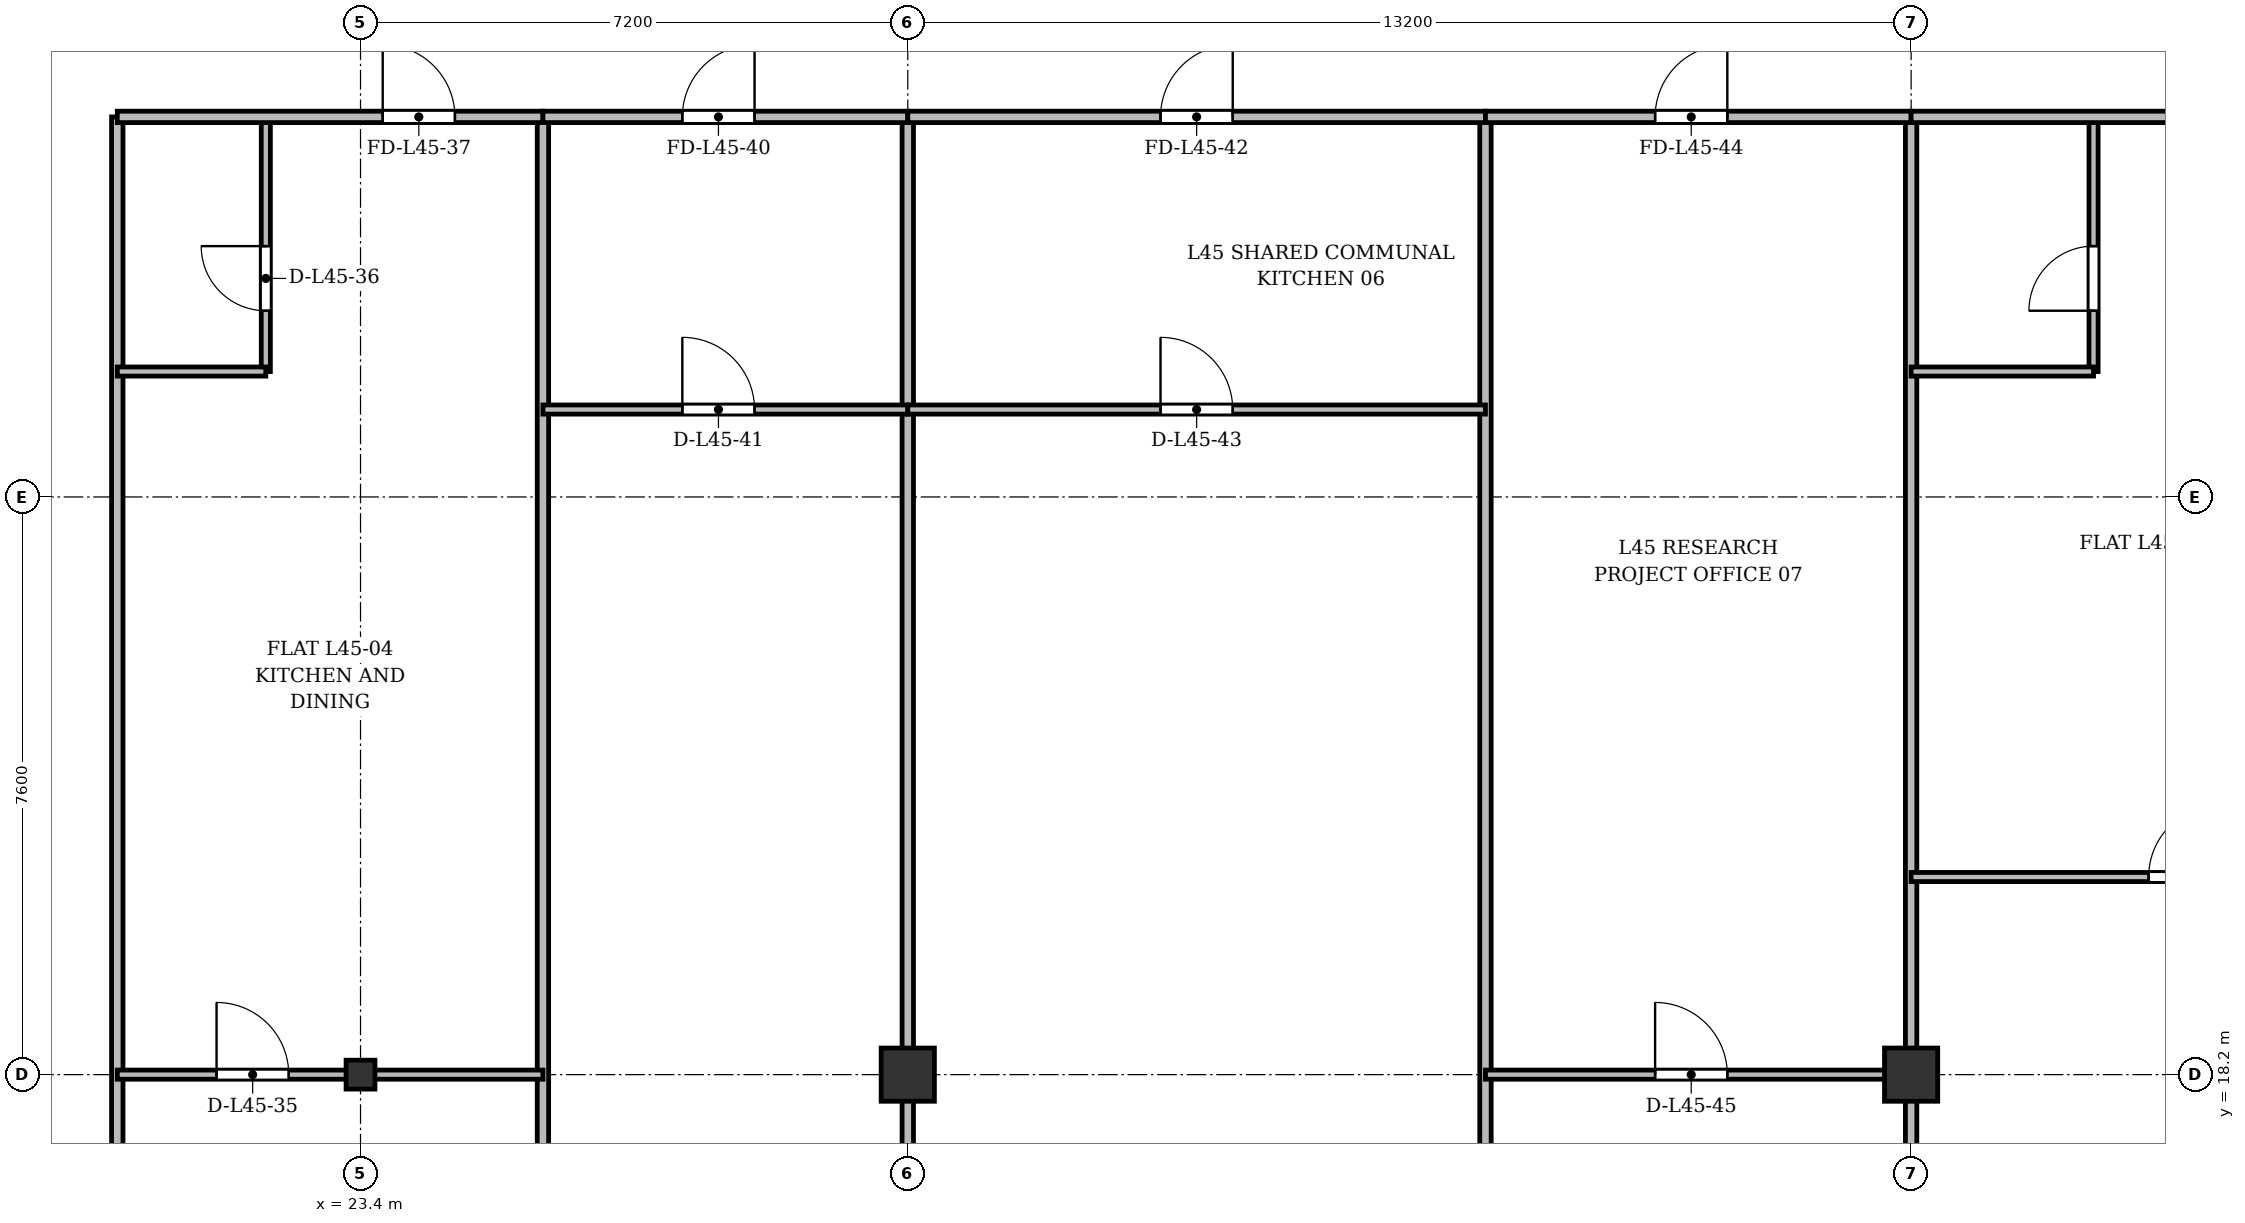
"""IFC4 building model, lengths in metres.
Left out: names, types, materials, properties, quantities, classifications, styles, units other than length and angle.
Written with IfcOpenShell. Run it as: python <this file> out.ifc"""

import sys

from ifc_helpers import new_model, si_unit, direction, frame, frame_2d, origin, origin_2d, place, context, subcontext, project, spatial, rectangle, i_section, extrude, source, transform, mapped, element, fill, save


model = new_model("IFC4")
c1 = context("Model", 3, precision=1e-05, world=origin(), true_north=direction((0.0, 1.0)))
c2 = subcontext(c1, "Body", "Model", "MODEL_VIEW")
j1 = project(units=[si_unit("LENGTHUNIT", "METRE"), si_unit("PLANEANGLEUNIT", "RADIAN")], contexts=[c1])
p1 = place(None, origin())
s1 = spatial("IfcSite", under=j1, at=p1, CompositionType="ELEMENT")
p2 = place(p1, origin())
s2 = spatial("IfcBuilding", under=s1, at=p2, CompositionType="ELEMENT")
p3 = place(p2, frame((0.0, 0.0, 171.7)))
s3 = spatial("IfcBuildingStorey", under=s2, at=p3, CompositionType="ELEMENT", Elevation=171.7)
m1 = source(origin(), c2, "Body", "SweptSolid", [
    extrude(i_section(OverallWidth=0.38, OverallDepth=0.38, WebThickness=0.02, FlangeThickness=0.03, at=origin_2d()), origin(), (0.0, 0.0, 1.0), 3.6),
])
p4 = place(p3, frame((23.4, 18.2, 0.0), z_axis=(0.0, 0.0, 1.0), x_axis=(1.0, 0.0, 0.0)))
e1 = element("IfcColumn", 1, at=p4, inside=s3, PredefinedType="COLUMN", context=c2, shape_type="MappedRepresentation", body=[
    mapped(m1, transform((0.0, 0.0, 0.0), x_axis=(1.0, 0.0, 0.0), y_axis=(0.0, 1.0, 0.0), z_axis=(0.0, 0.0, 1.0), scale=1.0)),
])
m2 = source(origin(), c2, "Body", "SweptSolid", [
    extrude(rectangle(XDim=0.7, YDim=0.7, at=origin_2d()), origin(), (0.0, 0.0, 1.0), 3.6),
])
for number, where, z_axis, x_axis in (
    (2, (30.6, 18.2, 0.0), (0.0, 0.0, 1.0), (1.0, 0.0, 0.0)),
    (3, (43.8, 18.2, 0.0), (0.0, 0.0, 1.0), (1.0, 0.0, 0.0)),
):
    element("IfcColumn", number, at=place(p3, frame(where, z_axis=z_axis, x_axis=x_axis)), inside=s3, PredefinedType="COLUMN", context=c2, shape_type="MappedRepresentation", body=[
        mapped(m2, transform((0.0, 0.0, 0.0), x_axis=(1.0, 0.0, 0.0), y_axis=(0.0, 1.0, 0.0), z_axis=(0.0, 0.0, 1.0), scale=1.0)),
    ])
p5 = place(p3, frame((25.8, 7.025, 0.0), z_axis=(0.0, 0.0, 1.0), x_axis=(0.0, 1.0, 0.0)))
e4 = element("IfcWall", 4, at=p5, inside=s3, PredefinedType="PARTITIONING", context=c2, shape_type="SweptSolid", body=[
    extrude(rectangle(XDim=23.775, YDim=0.15, at=frame_2d((11.888, 0.0))), origin(), (0.0, 0.0, 1.0), 2.75),
])
p6 = place(p3, frame((30.6, 3.525, 0.0), z_axis=(0.0, 0.0, 1.0), x_axis=(0.0, 1.0, 0.0)))
e5 = element("IfcWall", 5, at=p6, inside=s3, PredefinedType="PARTITIONING", context=c2, shape_type="SweptSolid", body=[
    extrude(rectangle(XDim=27.275, YDim=0.15, at=frame_2d((13.638, 0.0))), origin(), (0.0, 0.0, 1.0), 2.85),
])
p7 = place(p3, frame((38.2, 3.525, 0.0), z_axis=(0.0, 0.0, 1.0), x_axis=(0.0, 1.0, 0.0)))
e6 = element("IfcWall", 6, at=p7, inside=s3, PredefinedType="PARTITIONING", context=c2, shape_type="SweptSolid", body=[
    extrude(rectangle(XDim=27.275, YDim=0.15, at=frame_2d((13.638, 0.0))), origin(), (0.0, 0.0, 1.0), 2.75),
])
p8 = place(p3, frame((43.8, 3.525, 0.0), z_axis=(0.0, 0.0, 1.0), x_axis=(0.0, 1.0, 0.0)))
e7 = element("IfcWall", 7, at=p8, inside=s3, PredefinedType="PARTITIONING", context=c2, shape_type="SweptSolid", body=[
    extrude(rectangle(XDim=27.275, YDim=0.15, at=frame_2d((13.638, 0.0))), origin(), (0.0, 0.0, 1.0), 2.85),
])
p9 = place(p3, frame((20.2, 7.025, 0.0), z_axis=(0.0, 0.0, 1.0), x_axis=(0.0, 1.0, 0.0)))
e8 = element("IfcWall", 8, at=p9, inside=s3, PredefinedType="PARTITIONING", context=c2, shape_type="SweptSolid", body=[
    extrude(rectangle(XDim=23.775, YDim=0.15, at=frame_2d((11.888, 0.0))), origin(), (0.0, 0.0, 1.0), 2.75),
])
p10 = place(p3, frame((20.2, 18.2, 0.0), z_axis=(0.0, 0.0, 1.0), x_axis=(1.0, 0.0, 0.0)))
e9 = element("IfcWall", 9, at=p10, inside=s3, PredefinedType="PARTITIONING", context=c2, shape_type="SweptSolid", body=[
    extrude(rectangle(XDim=5.6, YDim=0.12, at=frame_2d((2.8, 0.0))), origin(), (0.0, 0.0, 1.0), 2.75),
])
p11 = place(p10, frame((1.306, 0.0, 0.0)))
e10 = element("IfcOpeningElement", 10, at=p11, cuts=e9, PredefinedType="OPENING", context=c2, shape_type="SweptSolid", body=[
    extrude(rectangle(XDim=0.95, YDim=2.15, at=frame_2d((0.475, 1.075))), frame((0.0, 0.07, 0.0), z_axis=(0.0, -1.0, 0.0), x_axis=(1.0, 0.0, 0.0)), (0.0, 0.0, 1.0), 0.14),
])
p12 = place(p3, frame((22.154, 27.45, 0.0), z_axis=(0.0, 0.0, 1.0), x_axis=(0.0, 1.0, 0.0)))
e11 = element("IfcWall", 11, at=p12, inside=s3, PredefinedType="PARTITIONING", context=c2, shape_type="SweptSolid", body=[
    extrude(rectangle(XDim=3.35, YDim=0.12, at=frame_2d((1.675, 0.0))), origin(), (0.0, 0.0, 1.0), 3.35),
])
p13 = place(p12, frame((0.8, 0.0, 0.0)))
e12 = element("IfcOpeningElement", 12, at=p13, cuts=e11, PredefinedType="OPENING", context=c2, shape_type="SweptSolid", body=[
    extrude(rectangle(XDim=0.85, YDim=2.1, at=frame_2d((0.425, 1.05))), frame((0.0, 0.07, 0.0), z_axis=(0.0, -1.0, 0.0), x_axis=(1.0, 0.0, 0.0)), (0.0, 0.0, 1.0), 0.14),
])
p14 = place(p3, frame((20.2, 27.45, 0.0), z_axis=(0.0, 0.0, 1.0), x_axis=(1.0, 0.0, 0.0)))
e13 = element("IfcWall", 13, at=p14, inside=s3, PredefinedType="PARTITIONING", context=c2, shape_type="SweptSolid", body=[
    extrude(rectangle(XDim=1.954, YDim=0.12, at=frame_2d((0.977, 0.0))), origin(), (0.0, 0.0, 1.0), 3.35),
])
p15 = place(p3, frame((20.2, 30.8, 0.0), z_axis=(0.0, 0.0, 1.0), x_axis=(1.0, 0.0, 0.0)))
e14 = element("IfcWall", 14, at=p15, inside=s3, PredefinedType="PARTITIONING", context=c2, shape_type="SweptSolid", body=[
    extrude(rectangle(XDim=5.6, YDim=0.15, at=frame_2d((2.8, 0.0))), origin(), (0.0, 0.0, 1.0), 2.85),
])
p16 = place(p15, frame((3.492, 0.0, 0.0)))
e15 = element("IfcOpeningElement", 15, at=p16, cuts=e14, PredefinedType="OPENING", context=c2, shape_type="SweptSolid", body=[
    extrude(rectangle(XDim=0.95, YDim=2.15, at=frame_2d((0.475, 1.075))), frame((0.0, 0.085, 0.0), z_axis=(0.0, -1.0, 0.0), x_axis=(1.0, 0.0, 0.0)), (0.0, 0.0, 1.0), 0.17),
])
p17 = place(p3, frame((25.8, 30.8, 0.0), z_axis=(0.0, 0.0, 1.0), x_axis=(1.0, 0.0, 0.0)))
e16 = element("IfcWall", 16, at=p17, inside=s3, PredefinedType="PARTITIONING", context=c2, shape_type="SweptSolid", body=[
    extrude(rectangle(XDim=4.8, YDim=0.15, at=frame_2d((2.4, 0.0))), origin(), (0.0, 0.0, 1.0), 2.85),
])
p18 = place(p17, frame((1.834, 0.0, 0.0)))
e17 = element("IfcOpeningElement", 17, at=p18, cuts=e16, PredefinedType="OPENING", context=c2, shape_type="SweptSolid", body=[
    extrude(rectangle(XDim=0.95, YDim=2.15, at=frame_2d((0.475, 1.075))), frame((0.0, 0.085, 0.0), z_axis=(0.0, -1.0, 0.0), x_axis=(1.0, 0.0, 0.0)), (0.0, 0.0, 1.0), 0.17),
])
p19 = place(p3, frame((25.8, 26.95, 0.0), z_axis=(0.0, 0.0, 1.0), x_axis=(1.0, 0.0, 0.0)))
e18 = element("IfcWall", 18, at=p19, inside=s3, PredefinedType="PARTITIONING", context=c2, shape_type="SweptSolid", body=[
    extrude(rectangle(XDim=4.8, YDim=0.12, at=frame_2d((2.4, 0.0))), origin(), (0.0, 0.0, 1.0), 2.85),
])
p20 = place(p19, frame((1.834, 0.0, 0.0)))
e19 = element("IfcOpeningElement", 19, at=p20, cuts=e18, PredefinedType="OPENING", context=c2, shape_type="SweptSolid", body=[
    extrude(rectangle(XDim=0.95, YDim=2.15, at=frame_2d((0.475, 1.075))), frame((0.0, 0.07, 0.0), z_axis=(0.0, -1.0, 0.0), x_axis=(1.0, 0.0, 0.0)), (0.0, 0.0, 1.0), 0.14),
])
p21 = place(p3, frame((30.6, 30.8, 0.0), z_axis=(0.0, 0.0, 1.0), x_axis=(1.0, 0.0, 0.0)))
e20 = element("IfcWall", 20, at=p21, inside=s3, PredefinedType="PARTITIONING", context=c2, shape_type="SweptSolid", body=[
    extrude(rectangle(XDim=7.6, YDim=0.15, at=frame_2d((3.8, 0.0))), origin(), (0.0, 0.0, 1.0), 2.85),
])
p22 = place(p21, frame((3.325, 0.0, 0.0)))
e21 = element("IfcOpeningElement", 21, at=p22, cuts=e20, PredefinedType="OPENING", context=c2, shape_type="SweptSolid", body=[
    extrude(rectangle(XDim=0.95, YDim=2.15, at=frame_2d((0.475, 1.075))), frame((0.0, 0.085, 0.0), z_axis=(0.0, -1.0, 0.0), x_axis=(1.0, 0.0, 0.0)), (0.0, 0.0, 1.0), 0.17),
])
p23 = place(p3, frame((30.6, 26.95, 0.0), z_axis=(0.0, 0.0, 1.0), x_axis=(1.0, 0.0, 0.0)))
e22 = element("IfcWall", 22, at=p23, inside=s3, PredefinedType="PARTITIONING", context=c2, shape_type="SweptSolid", body=[
    extrude(rectangle(XDim=7.6, YDim=0.12, at=frame_2d((3.8, 0.0))), origin(), (0.0, 0.0, 1.0), 2.85),
])
p24 = place(p23, frame((3.325, 0.0, 0.0)))
e23 = element("IfcOpeningElement", 23, at=p24, cuts=e22, PredefinedType="OPENING", context=c2, shape_type="SweptSolid", body=[
    extrude(rectangle(XDim=0.95, YDim=2.15, at=frame_2d((0.475, 1.075))), frame((0.0, 0.07, 0.0), z_axis=(0.0, -1.0, 0.0), x_axis=(1.0, 0.0, 0.0)), (0.0, 0.0, 1.0), 0.14),
])
p25 = place(p3, frame((38.2, 30.8, 0.0), z_axis=(0.0, 0.0, 1.0), x_axis=(1.0, 0.0, 0.0)))
e24 = element("IfcWall", 24, at=p25, inside=s3, PredefinedType="PARTITIONING", context=c2, shape_type="SweptSolid", body=[
    extrude(rectangle(XDim=5.6, YDim=0.15, at=frame_2d((2.8, 0.0))), origin(), (0.0, 0.0, 1.0), 2.85),
])
p26 = place(p25, frame((2.232, 0.0, 0.0)))
e25 = element("IfcOpeningElement", 25, at=p26, cuts=e24, PredefinedType="OPENING", context=c2, shape_type="SweptSolid", body=[
    extrude(rectangle(XDim=0.95, YDim=2.15, at=frame_2d((0.475, 1.075))), frame((0.0, 0.085, 0.0), z_axis=(0.0, -1.0, 0.0), x_axis=(1.0, 0.0, 0.0)), (0.0, 0.0, 1.0), 0.17),
])
p27 = place(p3, frame((38.2, 18.2, 0.0), z_axis=(0.0, 0.0, 1.0), x_axis=(1.0, 0.0, 0.0)))
e26 = element("IfcWall", 26, at=p27, inside=s3, PredefinedType="PARTITIONING", context=c2, shape_type="SweptSolid", body=[
    extrude(rectangle(XDim=5.6, YDim=0.12, at=frame_2d((2.8, 0.0))), origin(), (0.0, 0.0, 1.0), 2.75),
])
p28 = place(p27, frame((2.232, 0.0, 0.0)))
e27 = element("IfcOpeningElement", 27, at=p28, cuts=e26, PredefinedType="OPENING", context=c2, shape_type="SweptSolid", body=[
    extrude(rectangle(XDim=0.95, YDim=2.15, at=frame_2d((0.475, 1.075))), frame((0.0, 0.07, 0.0), z_axis=(0.0, -1.0, 0.0), x_axis=(1.0, 0.0, 0.0)), (0.0, 0.0, 1.0), 0.14),
])
p29 = place(p3, frame((43.8, 20.8, 0.0), z_axis=(0.0, 0.0, 1.0), x_axis=(1.0, 0.0, 0.0)))
e28 = element("IfcWall", 28, at=p29, inside=s3, PredefinedType="PARTITIONING", context=c2, shape_type="SweptSolid", body=[
    extrude(rectangle(XDim=7.2, YDim=0.12, at=frame_2d((3.6, 0.0))), origin(), (0.0, 0.0, 1.0), 2.85),
])
p30 = place(p29, frame((3.125, 0.0, 0.0)))
e29 = element("IfcOpeningElement", 29, at=p30, cuts=e28, PredefinedType="OPENING", context=c2, shape_type="SweptSolid", body=[
    extrude(rectangle(XDim=0.95, YDim=2.15, at=frame_2d((0.475, 1.075))), frame((0.0, 0.07, 0.0), z_axis=(0.0, -1.0, 0.0), x_axis=(1.0, 0.0, 0.0)), (0.0, 0.0, 1.0), 0.14),
])
p31 = place(p3, frame((46.2, 27.45, 0.0), z_axis=(0.0, 0.0, 1.0), x_axis=(0.0, 1.0, 0.0)))
e30 = element("IfcWall", 30, at=p31, inside=s3, PredefinedType="PARTITIONING", context=c2, shape_type="SweptSolid", body=[
    extrude(rectangle(XDim=3.35, YDim=0.12, at=frame_2d((1.675, 0.0))), origin(), (0.0, 0.0, 1.0), 3.35),
])
p32 = place(p31, frame((0.8, 0.0, 0.0)))
e31 = element("IfcOpeningElement", 31, at=p32, cuts=e30, PredefinedType="OPENING", context=c2, shape_type="SweptSolid", body=[
    extrude(rectangle(XDim=0.85, YDim=2.1, at=frame_2d((0.425, 1.05))), frame((0.0, 0.07, 0.0), z_axis=(0.0, -1.0, 0.0), x_axis=(1.0, 0.0, 0.0)), (0.0, 0.0, 1.0), 0.14),
])
p33 = place(p3, frame((43.8, 27.45, 0.0), z_axis=(0.0, 0.0, 1.0), x_axis=(1.0, 0.0, 0.0)))
e32 = element("IfcWall", 32, at=p33, inside=s3, PredefinedType="PARTITIONING", context=c2, shape_type="SweptSolid", body=[
    extrude(rectangle(XDim=2.4, YDim=0.12, at=frame_2d((1.2, 0.0))), origin(), (0.0, 0.0, 1.0), 2.85),
])
p34 = place(p3, frame((43.8, 30.8, 0.0), z_axis=(0.0, 0.0, 1.0), x_axis=(1.0, 0.0, 0.0)))
e33 = element("IfcWall", 33, at=p34, inside=s3, PredefinedType="PARTITIONING", context=c2, shape_type="SweptSolid", body=[
    extrude(rectangle(XDim=7.2, YDim=0.15, at=frame_2d((3.6, 0.0))), origin(), (0.0, 0.0, 1.0), 2.85),
])
p35 = place(p34, frame((4.706, 0.0, 0.0)))
e34 = element("IfcOpeningElement", 34, at=p35, cuts=e33, PredefinedType="OPENING", context=c2, shape_type="SweptSolid", body=[
    extrude(rectangle(XDim=0.95, YDim=2.15, at=frame_2d((0.475, 1.075))), frame((0.0, 0.085, 0.0), z_axis=(0.0, -1.0, 0.0), x_axis=(1.0, 0.0, 0.0)), (0.0, 0.0, 1.0), 0.17),
])
m3 = source(origin(), c2, "Body", "SweptSolid", [
    extrude(rectangle(XDim=0.95, YDim=2.15, at=frame_2d((0.475, 1.075))), frame((0.0, 0.025, 0.0), z_axis=(0.0, -1.0, 0.0), x_axis=(1.0, 0.0, 0.0)), (0.0, 0.0, 1.0), 0.05),
])
p36 = place(p11, origin())
e35 = element("IfcDoor", 35, at=p36, inside=s3, OperationType="SINGLE_SWING_LEFT", PredefinedType="DOOR", context=c2, shape_type="MappedRepresentation", body=[
    mapped(m3, transform((0.0, 0.0, 0.0), x_axis=(1.0, 0.0, 0.0), y_axis=(0.0, 1.0, 0.0), z_axis=(0.0, 0.0, 1.0), scale=1.0)),
])
fill(e10, e35)
m4 = source(origin(), c2, "Body", "SweptSolid", [
    extrude(rectangle(XDim=0.85, YDim=2.1, at=frame_2d((0.425, 1.05))), frame((0.0, 0.025, 0.0), z_axis=(0.0, -1.0, 0.0), x_axis=(1.0, 0.0, 0.0)), (0.0, 0.0, 1.0), 0.05),
])
p37 = place(p13, origin())
e36 = element("IfcDoor", 36, at=p37, inside=s3, OperationType="SINGLE_SWING_RIGHT", PredefinedType="DOOR", context=c2, shape_type="MappedRepresentation", body=[
    mapped(m4, transform((0.0, 0.0, 0.0), x_axis=(1.0, 0.0, 0.0), y_axis=(0.0, 1.0, 0.0), z_axis=(0.0, 0.0, 1.0), scale=1.0)),
])
fill(e12, e36)
p38 = place(p16, origin())
e37 = element("IfcDoor", 37, at=p38, inside=s3, OperationType="SINGLE_SWING_LEFT", PredefinedType="DOOR", context=c2, shape_type="MappedRepresentation", body=[
    mapped(m3, transform((0.0, 0.0, 0.0), x_axis=(1.0, 0.0, 0.0), y_axis=(0.0, 1.0, 0.0), z_axis=(0.0, 0.0, 1.0), scale=1.0)),
])
fill(e15, e37)
p39 = place(p18, origin())
e38 = element("IfcDoor", 38, at=p39, inside=s3, OperationType="SINGLE_SWING_RIGHT", PredefinedType="DOOR", context=c2, shape_type="MappedRepresentation", body=[
    mapped(m3, transform((0.0, 0.0, 0.0), x_axis=(1.0, 0.0, 0.0), y_axis=(0.0, 1.0, 0.0), z_axis=(0.0, 0.0, 1.0), scale=1.0)),
])
fill(e17, e38)
p40 = place(p20, origin())
e39 = element("IfcDoor", 39, at=p40, inside=s3, OperationType="SINGLE_SWING_LEFT", PredefinedType="DOOR", context=c2, shape_type="MappedRepresentation", body=[
    mapped(m3, transform((0.0, 0.0, 0.0), x_axis=(1.0, 0.0, 0.0), y_axis=(0.0, 1.0, 0.0), z_axis=(0.0, 0.0, 1.0), scale=1.0)),
])
fill(e19, e39)
p41 = place(p22, origin())
e40 = element("IfcDoor", 40, at=p41, inside=s3, OperationType="SINGLE_SWING_RIGHT", PredefinedType="DOOR", context=c2, shape_type="MappedRepresentation", body=[
    mapped(m3, transform((0.0, 0.0, 0.0), x_axis=(1.0, 0.0, 0.0), y_axis=(0.0, 1.0, 0.0), z_axis=(0.0, 0.0, 1.0), scale=1.0)),
])
fill(e21, e40)
p42 = place(p24, origin())
e41 = element("IfcDoor", 41, at=p42, inside=s3, OperationType="SINGLE_SWING_LEFT", PredefinedType="DOOR", context=c2, shape_type="MappedRepresentation", body=[
    mapped(m3, transform((0.0, 0.0, 0.0), x_axis=(1.0, 0.0, 0.0), y_axis=(0.0, 1.0, 0.0), z_axis=(0.0, 0.0, 1.0), scale=1.0)),
])
fill(e23, e41)
p43 = place(p26, origin())
e42 = element("IfcDoor", 42, at=p43, inside=s3, OperationType="SINGLE_SWING_RIGHT", PredefinedType="DOOR", context=c2, shape_type="MappedRepresentation", body=[
    mapped(m3, transform((0.0, 0.0, 0.0), x_axis=(1.0, 0.0, 0.0), y_axis=(0.0, 1.0, 0.0), z_axis=(0.0, 0.0, 1.0), scale=1.0)),
])
fill(e25, e42)
p44 = place(p28, origin())
e43 = element("IfcDoor", 43, at=p44, inside=s3, OperationType="SINGLE_SWING_LEFT", PredefinedType="DOOR", context=c2, shape_type="MappedRepresentation", body=[
    mapped(m3, transform((0.0, 0.0, 0.0), x_axis=(1.0, 0.0, 0.0), y_axis=(0.0, 1.0, 0.0), z_axis=(0.0, 0.0, 1.0), scale=1.0)),
])
fill(e27, e43)
p45 = place(p30, origin())
e44 = element("IfcDoor", 44, at=p45, inside=s3, OperationType="SINGLE_SWING_RIGHT", PredefinedType="DOOR", context=c2, shape_type="MappedRepresentation", body=[
    mapped(m3, transform((0.0, 0.0, 0.0), x_axis=(1.0, 0.0, 0.0), y_axis=(0.0, 1.0, 0.0), z_axis=(0.0, 0.0, 1.0), scale=1.0)),
])
fill(e29, e44)
p46 = place(p32, origin())
e45 = element("IfcDoor", 45, at=p46, inside=s3, OperationType="SINGLE_SWING_LEFT", PredefinedType="DOOR", context=c2, shape_type="MappedRepresentation", body=[
    mapped(m4, transform((0.0, 0.0, 0.0), x_axis=(1.0, 0.0, 0.0), y_axis=(0.0, 1.0, 0.0), z_axis=(0.0, 0.0, 1.0), scale=1.0)),
])
fill(e31, e45)
save(model, sys.argv[1])
